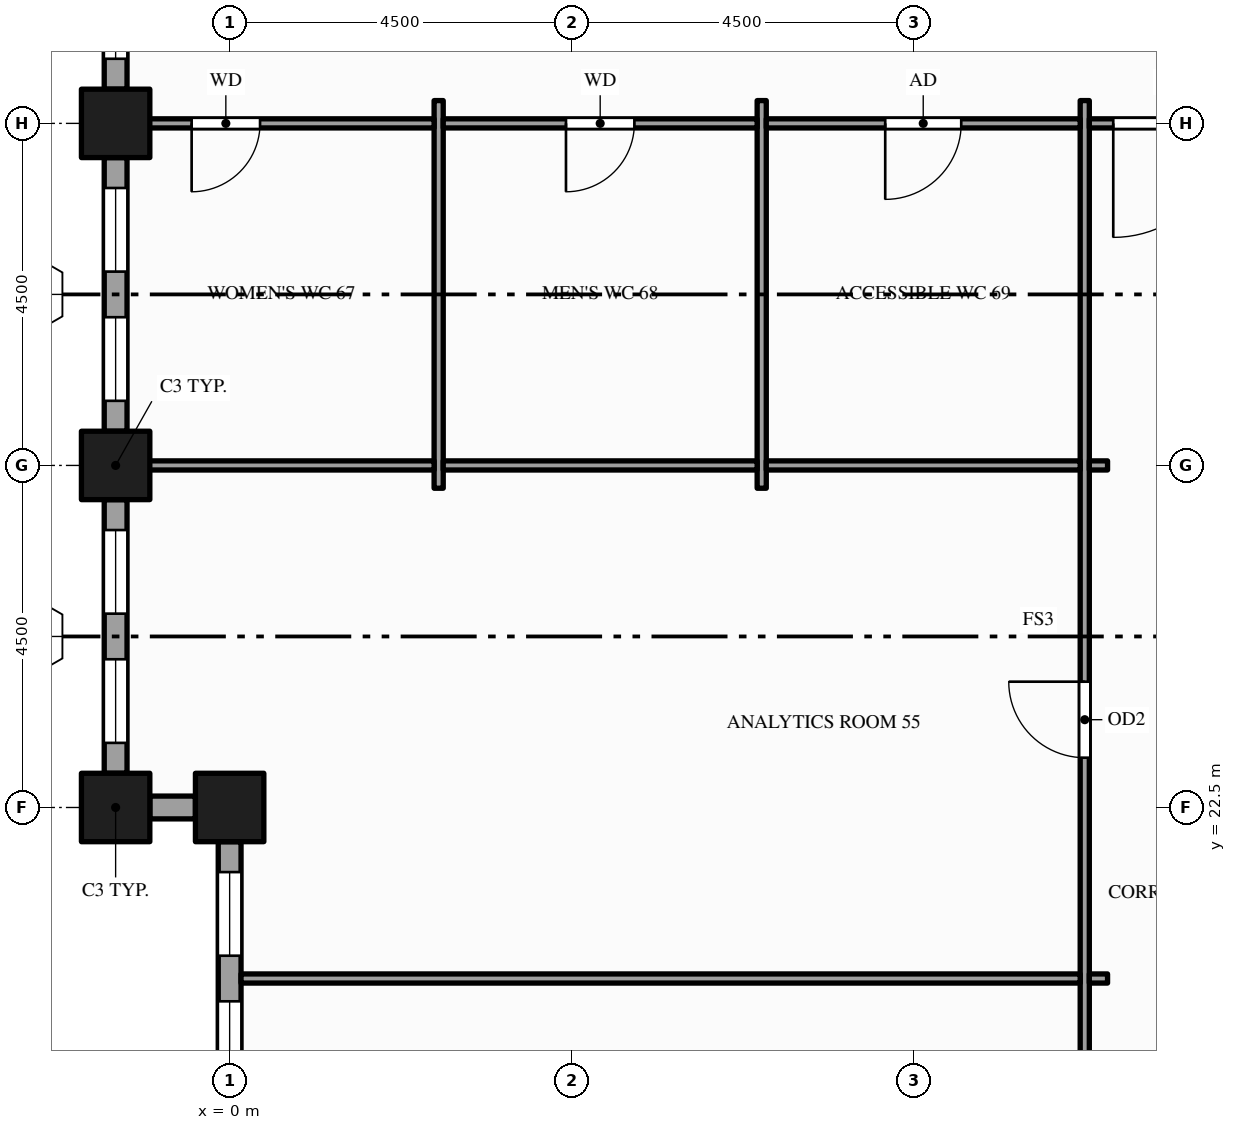
"""IFC4 building model, lengths in metres.
Left out: names, types, materials, properties, quantities, classifications, styles, units other than length and angle.
Written with IfcOpenShell. Run it as: python <this file> out.ifc"""

import sys

from ifc_helpers import new_model, si_unit, direction, frame, frame_2d, origin, origin_2d, place, context, subcontext, project, spatial, rectangle, hollow_rectangle, extrude, element, fill, save


model = new_model("IFC4")
c1 = context("Model", 3, precision=1e-05, world=origin(), true_north=direction((0.0, 1.0)))
c2 = subcontext(c1, "Body", "Model", "MODEL_VIEW")
j1 = project(units=[si_unit("LENGTHUNIT", "METRE"), si_unit("PLANEANGLEUNIT", "RADIAN")], contexts=[c1])
p1 = place(None, origin())
s1 = spatial("IfcSite", under=j1, at=p1, CompositionType="ELEMENT")
p2 = place(p1, origin())
s2 = spatial("IfcBuilding", under=s1, at=p2, CompositionType="ELEMENT")
p3 = place(p2, frame((0.0, 0.0, 151.0)))
s3 = spatial("IfcBuildingStorey", under=s2, at=p3, CompositionType="ELEMENT", Elevation=151.0)
for number, where, z_axis, x_axis in (
    (1, (-1.5, 22.5, -0.15), (0.0, 0.0, 1.0), (1.0, 0.0, 0.0)),
    (2, (-1.5, 27.0, -0.15), (0.0, 0.0, 1.0), (1.0, 0.0, 0.0)),
    (3, (-1.5, 31.5, -0.15), (0.0, 0.0, 1.0), (1.0, 0.0, 0.0)),
    (4, (0.0, 22.5, -0.15), (0.0, 0.0, 1.0), (1.0, 0.0, 0.0)),
):
    element("IfcColumn", number, at=place(p3, frame(where, z_axis=z_axis, x_axis=x_axis)), inside=s3, PredefinedType="COLUMN", context=c2, shape_type="SweptSolid", body=[
        extrude(hollow_rectangle(XDim=0.9, YDim=0.9, WallThickness=0.045, at=origin_2d()), origin(), (0.0, 0.0, 1.0), 4.0),
    ])
p4 = place(p3, frame((-1.5, 35.55, 0.0), z_axis=(0.0, 0.0, 1.0), x_axis=(0.0, -1.0, 0.0)))
e5 = element("IfcWall", 5, at=p4, inside=s3, PredefinedType="STANDARD", context=c2, shape_type="SweptSolid", body=[
    extrude(rectangle(XDim=3.6, YDim=0.3, at=frame_2d((1.8, 0.0))), origin(), (0.0, 0.0, 1.0), 3.149),
])
p5 = place(p4, frame((0.4, 0.0, 0.9)))
e6 = element("IfcOpeningElement", 6, at=p5, cuts=e5, PredefinedType="OPENING", context=c2, shape_type="SweptSolid", body=[
    extrude(rectangle(XDim=1.1, YDim=2.0, at=frame_2d((0.55, 1.0))), frame((0.0, 0.16, 0.0), z_axis=(0.0, -1.0, 0.0), x_axis=(1.0, 0.0, 0.0)), (0.0, 0.0, 1.0), 0.32),
])
p6 = place(p4, frame((2.1, 0.0, 0.9)))
e7 = element("IfcOpeningElement", 7, at=p6, cuts=e5, PredefinedType="OPENING", context=c2, shape_type="SweptSolid", body=[
    extrude(rectangle(XDim=1.1, YDim=2.0, at=frame_2d((0.55, 1.0))), frame((0.0, 0.16, 0.0), z_axis=(0.0, -1.0, 0.0), x_axis=(1.0, 0.0, 0.0)), (0.0, 0.0, 1.0), 0.32),
])
p7 = place(p3, frame((-1.5, 31.05, 0.0), z_axis=(0.0, 0.0, 1.0), x_axis=(0.0, -1.0, 0.0)))
e8 = element("IfcWall", 8, at=p7, inside=s3, PredefinedType="STANDARD", context=c2, shape_type="SweptSolid", body=[
    extrude(rectangle(XDim=3.6, YDim=0.3, at=frame_2d((1.8, 0.0))), origin(), (0.0, 0.0, 1.0), 3.149),
])
p8 = place(p7, frame((0.4, 0.0, 0.9)))
e9 = element("IfcOpeningElement", 9, at=p8, cuts=e8, PredefinedType="OPENING", context=c2, shape_type="SweptSolid", body=[
    extrude(rectangle(XDim=1.1, YDim=2.0, at=frame_2d((0.55, 1.0))), frame((0.0, 0.16, 0.0), z_axis=(0.0, -1.0, 0.0), x_axis=(1.0, 0.0, 0.0)), (0.0, 0.0, 1.0), 0.32),
])
p9 = place(p7, frame((2.1, 0.0, 0.9)))
e10 = element("IfcOpeningElement", 10, at=p9, cuts=e8, PredefinedType="OPENING", context=c2, shape_type="SweptSolid", body=[
    extrude(rectangle(XDim=1.1, YDim=2.0, at=frame_2d((0.55, 1.0))), frame((0.0, 0.16, 0.0), z_axis=(0.0, -1.0, 0.0), x_axis=(1.0, 0.0, 0.0)), (0.0, 0.0, 1.0), 0.32),
])
p10 = place(p3, frame((-1.5, 26.55, 0.0), z_axis=(0.0, 0.0, 1.0), x_axis=(0.0, -1.0, 0.0)))
e11 = element("IfcWall", 11, at=p10, inside=s3, PredefinedType="STANDARD", context=c2, shape_type="SweptSolid", body=[
    extrude(rectangle(XDim=3.6, YDim=0.3, at=frame_2d((1.8, 0.0))), origin(), (0.0, 0.0, 1.0), 3.149),
])
p11 = place(p10, frame((0.4, 0.0, 0.9)))
e12 = element("IfcOpeningElement", 12, at=p11, cuts=e11, PredefinedType="OPENING", context=c2, shape_type="SweptSolid", body=[
    extrude(rectangle(XDim=1.1, YDim=2.0, at=frame_2d((0.55, 1.0))), frame((0.0, 0.16, 0.0), z_axis=(0.0, -1.0, 0.0), x_axis=(1.0, 0.0, 0.0)), (0.0, 0.0, 1.0), 0.32),
])
p12 = place(p10, frame((2.1, 0.0, 0.9)))
e13 = element("IfcOpeningElement", 13, at=p12, cuts=e11, PredefinedType="OPENING", context=c2, shape_type="SweptSolid", body=[
    extrude(rectangle(XDim=1.1, YDim=2.0, at=frame_2d((0.55, 1.0))), frame((0.0, 0.16, 0.0), z_axis=(0.0, -1.0, 0.0), x_axis=(1.0, 0.0, 0.0)), (0.0, 0.0, 1.0), 0.32),
])
p13 = place(p3, frame((-1.05, 22.5, 0.0), z_axis=(0.0, 0.0, 1.0), x_axis=(1.0, 0.0, 0.0)))
e14 = element("IfcWall", 14, at=p13, inside=s3, PredefinedType="STANDARD", context=c2, shape_type="SweptSolid", body=[
    extrude(rectangle(XDim=0.6, YDim=0.3, at=frame_2d((0.3, 0.0))), origin(), (0.0, 0.0, 1.0), 3.149),
])
p14 = place(p3, frame((0.0, 22.05, 0.0), z_axis=(0.0, 0.0, 1.0), x_axis=(0.0, -1.0, 0.0)))
e15 = element("IfcWall", 15, at=p14, inside=s3, PredefinedType="STANDARD", context=c2, shape_type="SweptSolid", body=[
    extrude(rectangle(XDim=3.6, YDim=0.3, at=frame_2d((1.8, 0.0))), origin(), (0.0, 0.0, 1.0), 3.149),
])
p15 = place(p14, frame((0.4, 0.0, 0.9)))
e16 = element("IfcOpeningElement", 16, at=p15, cuts=e15, PredefinedType="OPENING", context=c2, shape_type="SweptSolid", body=[
    extrude(rectangle(XDim=1.1, YDim=2.0, at=frame_2d((0.55, 1.0))), frame((0.0, 0.16, 0.0), z_axis=(0.0, -1.0, 0.0), x_axis=(1.0, 0.0, 0.0)), (0.0, 0.0, 1.0), 0.32),
])
p16 = place(p14, frame((2.1, 0.0, 0.9)))
e17 = element("IfcOpeningElement", 17, at=p16, cuts=e15, PredefinedType="OPENING", context=c2, shape_type="SweptSolid", body=[
    extrude(rectangle(XDim=1.1, YDim=2.0, at=frame_2d((0.55, 1.0))), frame((0.0, 0.16, 0.0), z_axis=(0.0, -1.0, 0.0), x_axis=(1.0, 0.0, 0.0)), (0.0, 0.0, 1.0), 0.32),
])
for number, where, z_axis, x_axis in (
    (18, (2.75, 26.7, 0.0), (0.0, 0.0, 1.0), (0.0, 1.0, 0.0)),
    (19, (7.0, 26.7, 0.0), (0.0, 0.0, 1.0), (0.0, 1.0, 0.0)),
):
    element("IfcWall", number, at=place(p3, frame(where, z_axis=z_axis, x_axis=x_axis)), inside=s3, PredefinedType="PARTITIONING", context=c2, shape_type="SweptSolid", body=[
        extrude(rectangle(XDim=5.1, YDim=0.12, at=frame_2d((2.55, 0.0))), origin(), (0.0, 0.0, 1.0), 3.85),
    ])
p17 = place(p3, frame((11.25, 10.95, 0.0), z_axis=(0.0, 0.0, 1.0), x_axis=(0.0, 1.0, 0.0)))
e20 = element("IfcWall", 20, at=p17, inside=s3, PredefinedType="PARTITIONING", context=c2, shape_type="SweptSolid", body=[
    extrude(rectangle(XDim=20.85, YDim=0.12, at=frame_2d((10.425, 0.0))), origin(), (0.0, 0.0, 1.0), 2.6),
])
p18 = place(p17, frame((2.05, 0.0, 0.0)))
e21 = element("IfcOpeningElement", 21, at=p18, cuts=e20, PredefinedType="OPENING", context=c2, shape_type="SweptSolid", body=[
    extrude(rectangle(XDim=1.0, YDim=2.1, at=frame_2d((0.5, 1.05))), frame((0.0, 0.07, 0.0), z_axis=(0.0, -1.0, 0.0), x_axis=(1.0, 0.0, 0.0)), (0.0, 0.0, 1.0), 0.14),
])
p19 = place(p17, frame((6.55, 0.0, 0.0)))
e22 = element("IfcOpeningElement", 22, at=p19, cuts=e20, PredefinedType="OPENING", context=c2, shape_type="SweptSolid", body=[
    extrude(rectangle(XDim=1.0, YDim=2.1, at=frame_2d((0.5, 1.05))), frame((0.0, 0.07, 0.0), z_axis=(0.0, -1.0, 0.0), x_axis=(1.0, 0.0, 0.0)), (0.0, 0.0, 1.0), 0.14),
])
p20 = place(p17, frame((12.205, 0.0, 0.0)))
e23 = element("IfcOpeningElement", 23, at=p20, cuts=e20, PredefinedType="OPENING", context=c2, shape_type="SweptSolid", body=[
    extrude(rectangle(XDim=1.0, YDim=2.1, at=frame_2d((0.5, 1.05))), frame((0.0, 0.07, 0.0), z_axis=(0.0, -1.0, 0.0), x_axis=(1.0, 0.0, 0.0)), (0.0, 0.0, 1.0), 0.14),
])
p21 = place(p3, frame((0.15, 20.25, 0.0), z_axis=(0.0, 0.0, 1.0), x_axis=(1.0, 0.0, 0.0)))
e24 = element("IfcWall", 24, at=p21, inside=s3, PredefinedType="PARTITIONING", context=c2, shape_type="SweptSolid", body=[
    extrude(rectangle(XDim=11.04, YDim=0.12, at=frame_2d((5.52, 0.0))), origin(), (0.0, 0.0, 1.0), 2.87),
])
p22 = place(p3, frame((11.31, 20.25, 0.0), z_axis=(0.0, 0.0, 1.0), x_axis=(1.0, 0.0, 0.0)))
e25 = element("IfcWall", 25, at=p22, inside=s3, PredefinedType="PARTITIONING", context=c2, shape_type="SweptSolid", body=[
    extrude(rectangle(XDim=0.24, YDim=0.12, at=frame_2d((0.12, 0.0))), origin(), (0.0, 0.0, 1.0), 2.87),
])
p23 = place(p3, frame((-1.35, 27.0, 0.0), z_axis=(0.0, 0.0, 1.0), x_axis=(1.0, 0.0, 0.0)))
e26 = element("IfcWall", 26, at=p23, inside=s3, PredefinedType="PARTITIONING", context=c2, shape_type="SweptSolid", body=[
    extrude(rectangle(XDim=4.04, YDim=0.12, at=frame_2d((2.02, 0.0))), origin(), (0.0, 0.0, 1.0), 2.87),
])
for number, where, z_axis, x_axis in (
    (27, (2.81, 27.0, 0.0), (0.0, 0.0, 1.0), (1.0, 0.0, 0.0)),
    (28, (7.06, 27.0, 0.0), (0.0, 0.0, 1.0), (1.0, 0.0, 0.0)),
):
    element("IfcWall", number, at=place(p3, frame(where, z_axis=z_axis, x_axis=x_axis)), inside=s3, PredefinedType="PARTITIONING", context=c2, shape_type="SweptSolid", body=[
        extrude(rectangle(XDim=4.13, YDim=0.12, at=frame_2d((2.065, 0.0))), origin(), (0.0, 0.0, 1.0), 2.87),
    ])
p24 = place(p3, frame((11.31, 27.0, 0.0), z_axis=(0.0, 0.0, 1.0), x_axis=(1.0, 0.0, 0.0)))
e29 = element("IfcWall", 29, at=p24, inside=s3, PredefinedType="PARTITIONING", context=c2, shape_type="SweptSolid", body=[
    extrude(rectangle(XDim=0.24, YDim=0.12, at=frame_2d((0.12, 0.0))), origin(), (0.0, 0.0, 1.0), 2.87),
])
p25 = place(p3, frame((-1.35, 31.5, 0.0), z_axis=(0.0, 0.0, 1.0), x_axis=(1.0, 0.0, 0.0)))
e30 = element("IfcWall", 30, at=p25, inside=s3, PredefinedType="PARTITIONING", context=c2, shape_type="SweptSolid", body=[
    extrude(rectangle(XDim=4.04, YDim=0.12, at=frame_2d((2.02, 0.0))), origin(), (0.0, 0.0, 1.0), 2.87),
])
p26 = place(p25, frame((0.85, 0.0, 0.0)))
e31 = element("IfcOpeningElement", 31, at=p26, cuts=e30, PredefinedType="OPENING", context=c2, shape_type="SweptSolid", body=[
    extrude(rectangle(XDim=0.9, YDim=2.1, at=frame_2d((0.45, 1.05))), frame((0.0, 0.07, 0.0), z_axis=(0.0, -1.0, 0.0), x_axis=(1.0, 0.0, 0.0)), (0.0, 0.0, 1.0), 0.14),
])
p27 = place(p3, frame((2.81, 31.5, 0.0), z_axis=(0.0, 0.0, 1.0), x_axis=(1.0, 0.0, 0.0)))
e32 = element("IfcWall", 32, at=p27, inside=s3, PredefinedType="PARTITIONING", context=c2, shape_type="SweptSolid", body=[
    extrude(rectangle(XDim=4.13, YDim=0.12, at=frame_2d((2.065, 0.0))), origin(), (0.0, 0.0, 1.0), 2.87),
])
p28 = place(p27, frame((1.615, 0.0, 0.0)))
e33 = element("IfcOpeningElement", 33, at=p28, cuts=e32, PredefinedType="OPENING", context=c2, shape_type="SweptSolid", body=[
    extrude(rectangle(XDim=0.9, YDim=2.1, at=frame_2d((0.45, 1.05))), frame((0.0, 0.07, 0.0), z_axis=(0.0, -1.0, 0.0), x_axis=(1.0, 0.0, 0.0)), (0.0, 0.0, 1.0), 0.14),
])
p29 = place(p3, frame((7.06, 31.5, 0.0), z_axis=(0.0, 0.0, 1.0), x_axis=(1.0, 0.0, 0.0)))
e34 = element("IfcWall", 34, at=p29, inside=s3, PredefinedType="PARTITIONING", context=c2, shape_type="SweptSolid", body=[
    extrude(rectangle(XDim=4.13, YDim=0.12, at=frame_2d((2.065, 0.0))), origin(), (0.0, 0.0, 1.0), 2.87),
])
p30 = place(p29, frame((1.565, 0.0, 0.0)))
e35 = element("IfcOpeningElement", 35, at=p30, cuts=e34, PredefinedType="OPENING", context=c2, shape_type="SweptSolid", body=[
    extrude(rectangle(XDim=1.0, YDim=2.1, at=frame_2d((0.5, 1.05))), frame((0.0, 0.07, 0.0), z_axis=(0.0, -1.0, 0.0), x_axis=(1.0, 0.0, 0.0)), (0.0, 0.0, 1.0), 0.14),
])
p31 = place(p3, frame((11.31, 31.5, 0.0), z_axis=(0.0, 0.0, 1.0), x_axis=(1.0, 0.0, 0.0)))
e36 = element("IfcWall", 36, at=p31, inside=s3, PredefinedType="PARTITIONING", context=c2, shape_type="SweptSolid", body=[
    extrude(rectangle(XDim=2.13, YDim=0.12, at=frame_2d((1.065, 0.0))), origin(), (0.0, 0.0, 1.0), 2.87),
])
p32 = place(p31, frame((0.315, 0.0, 0.0)))
e37 = element("IfcOpeningElement", 37, at=p32, cuts=e36, PredefinedType="OPENING", context=c2, shape_type="SweptSolid", body=[
    extrude(rectangle(XDim=1.5, YDim=2.1, at=frame_2d((0.75, 1.05))), frame((0.0, 0.07, 0.0), z_axis=(0.0, -1.0, 0.0), x_axis=(1.0, 0.0, 0.0)), (0.0, 0.0, 1.0), 0.14),
])
p33 = place(p6, origin())
e38 = element("IfcWindow", 38, at=p33, inside=s3, PartitioningType="SINGLE_PANEL", PredefinedType="WINDOW", context=c2, shape_type="SweptSolid", body=[
    extrude(rectangle(XDim=1.1, YDim=2.0, at=frame_2d((0.55, 1.0))), frame((0.0, 0.03, 0.0), z_axis=(0.0, -1.0, 0.0), x_axis=(1.0, 0.0, 0.0)), (0.0, 0.0, 1.0), 0.06),
])
fill(e7, e38)
p34 = place(p8, origin())
e39 = element("IfcWindow", 39, at=p34, inside=s3, PartitioningType="SINGLE_PANEL", PredefinedType="WINDOW", context=c2, shape_type="SweptSolid", body=[
    extrude(rectangle(XDim=1.1, YDim=2.0, at=frame_2d((0.55, 1.0))), frame((0.0, 0.03, 0.0), z_axis=(0.0, -1.0, 0.0), x_axis=(1.0, 0.0, 0.0)), (0.0, 0.0, 1.0), 0.06),
])
fill(e9, e39)
p35 = place(p9, origin())
e40 = element("IfcWindow", 40, at=p35, inside=s3, PartitioningType="SINGLE_PANEL", PredefinedType="WINDOW", context=c2, shape_type="SweptSolid", body=[
    extrude(rectangle(XDim=1.1, YDim=2.0, at=frame_2d((0.55, 1.0))), frame((0.0, 0.03, 0.0), z_axis=(0.0, -1.0, 0.0), x_axis=(1.0, 0.0, 0.0)), (0.0, 0.0, 1.0), 0.06),
])
fill(e10, e40)
p36 = place(p11, origin())
e41 = element("IfcWindow", 41, at=p36, inside=s3, PartitioningType="SINGLE_PANEL", PredefinedType="WINDOW", context=c2, shape_type="SweptSolid", body=[
    extrude(rectangle(XDim=1.1, YDim=2.0, at=frame_2d((0.55, 1.0))), frame((0.0, 0.03, 0.0), z_axis=(0.0, -1.0, 0.0), x_axis=(1.0, 0.0, 0.0)), (0.0, 0.0, 1.0), 0.06),
])
fill(e12, e41)
p37 = place(p12, origin())
e42 = element("IfcWindow", 42, at=p37, inside=s3, PartitioningType="SINGLE_PANEL", PredefinedType="WINDOW", context=c2, shape_type="SweptSolid", body=[
    extrude(rectangle(XDim=1.1, YDim=2.0, at=frame_2d((0.55, 1.0))), frame((0.0, 0.03, 0.0), z_axis=(0.0, -1.0, 0.0), x_axis=(1.0, 0.0, 0.0)), (0.0, 0.0, 1.0), 0.06),
])
fill(e13, e42)
p38 = place(p15, origin())
e43 = element("IfcWindow", 43, at=p38, inside=s3, PartitioningType="SINGLE_PANEL", PredefinedType="WINDOW", context=c2, shape_type="SweptSolid", body=[
    extrude(rectangle(XDim=1.1, YDim=2.0, at=frame_2d((0.55, 1.0))), frame((0.0, 0.03, 0.0), z_axis=(0.0, -1.0, 0.0), x_axis=(1.0, 0.0, 0.0)), (0.0, 0.0, 1.0), 0.06),
])
fill(e16, e43)
p39 = place(p16, origin())
e44 = element("IfcWindow", 44, at=p39, inside=s3, PartitioningType="SINGLE_PANEL", PredefinedType="WINDOW", context=c2, shape_type="SweptSolid", body=[
    extrude(rectangle(XDim=1.1, YDim=2.0, at=frame_2d((0.55, 1.0))), frame((0.0, 0.03, 0.0), z_axis=(0.0, -1.0, 0.0), x_axis=(1.0, 0.0, 0.0)), (0.0, 0.0, 1.0), 0.06),
])
fill(e17, e44)
p40 = place(p32, origin())
e45 = element("IfcDoor", 45, at=p40, inside=s3, OperationType="SINGLE_SWING_LEFT", PredefinedType="DOOR", context=c2, shape_type="SweptSolid", body=[
    extrude(rectangle(XDim=1.5, YDim=2.1, at=frame_2d((0.75, 1.05))), frame((0.0, 0.025, 0.0), z_axis=(0.0, -1.0, 0.0), x_axis=(1.0, 0.0, 0.0)), (0.0, 0.0, 1.0), 0.05),
])
fill(e37, e45)
p41 = place(p20, origin())
e46 = element("IfcDoor", 46, at=p41, inside=s3, OperationType="SINGLE_SWING_RIGHT", PredefinedType="DOOR", context=c2, shape_type="SweptSolid", body=[
    extrude(rectangle(XDim=1.0, YDim=2.1, at=frame_2d((0.5, 1.05))), frame((0.0, 0.025, 0.0), z_axis=(0.0, -1.0, 0.0), x_axis=(1.0, 0.0, 0.0)), (0.0, 0.0, 1.0), 0.05),
])
fill(e23, e46)
p42 = place(p26, origin())
e47 = element("IfcDoor", 47, at=p42, inside=s3, OperationType="SINGLE_SWING_LEFT", PredefinedType="DOOR", context=c2, shape_type="SweptSolid", body=[
    extrude(rectangle(XDim=0.9, YDim=2.1, at=frame_2d((0.45, 1.05))), frame((0.0, 0.025, 0.0), z_axis=(0.0, -1.0, 0.0), x_axis=(1.0, 0.0, 0.0)), (0.0, 0.0, 1.0), 0.05),
])
fill(e31, e47)
p43 = place(p28, origin())
e48 = element("IfcDoor", 48, at=p43, inside=s3, OperationType="SINGLE_SWING_LEFT", PredefinedType="DOOR", context=c2, shape_type="SweptSolid", body=[
    extrude(rectangle(XDim=0.9, YDim=2.1, at=frame_2d((0.45, 1.05))), frame((0.0, 0.025, 0.0), z_axis=(0.0, -1.0, 0.0), x_axis=(1.0, 0.0, 0.0)), (0.0, 0.0, 1.0), 0.05),
])
fill(e33, e48)
p44 = place(p30, origin())
e49 = element("IfcDoor", 49, at=p44, inside=s3, OperationType="SINGLE_SWING_LEFT", PredefinedType="DOOR", context=c2, shape_type="SweptSolid", body=[
    extrude(rectangle(XDim=1.0, YDim=2.1, at=frame_2d((0.5, 1.05))), frame((0.0, 0.025, 0.0), z_axis=(0.0, -1.0, 0.0), x_axis=(1.0, 0.0, 0.0)), (0.0, 0.0, 1.0), 0.05),
])
fill(e35, e49)
save(model, sys.argv[1])
